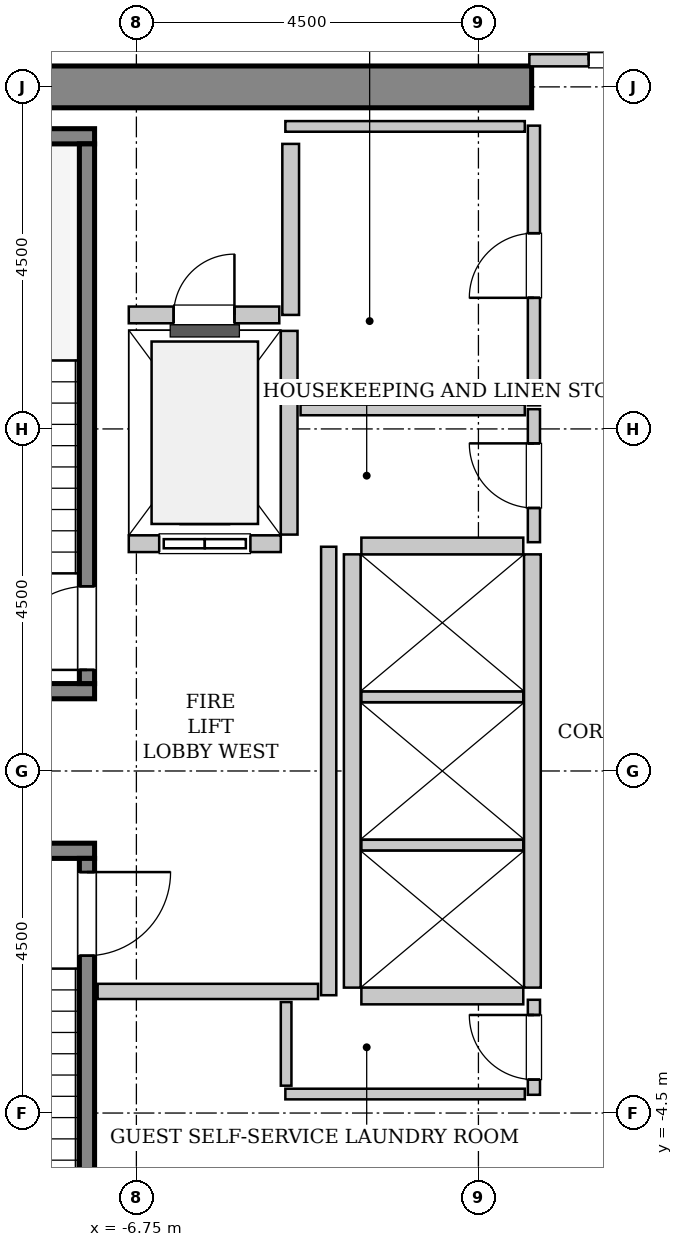
"""IFC4 building model, lengths in metres.
Left out: names, types, materials, properties, quantities, classifications, styles, units other than length and angle.
Written with IfcOpenShell. Run it as: python <this file> out.ifc"""

import sys

from ifc_helpers import new_model, si_unit, direction, frame, frame_2d, origin, place, context, subcontext, project, spatial, rectangle, extrude, source, transform, mapped, element, fill, save


model = new_model("IFC4")
c1 = context("Model", 3, precision=1e-05, world=origin(), true_north=direction((0.0, 1.0)))
c2 = subcontext(c1, "Body", "Model", "MODEL_VIEW")
j1 = project(units=[si_unit("LENGTHUNIT", "METRE"), si_unit("PLANEANGLEUNIT", "RADIAN")], contexts=[c1])
p1 = place(None, origin())
s1 = spatial("IfcSite", under=j1, at=p1, CompositionType="ELEMENT")
p2 = place(p1, origin())
s2 = spatial("IfcBuilding", under=s1, at=p2, CompositionType="ELEMENT")
p3 = place(p2, frame((0.0, 0.0, 167.8)))
s3 = spatial("IfcBuildingStorey", under=s2, at=p3, CompositionType="ELEMENT", Elevation=167.8)
m1 = source(origin(), c2, "Body", "SweptSolid", [
    extrude(rectangle(XDim=9.975, YDim=0.55, at=frame_2d((4.987, 0.0))), origin(), (0.0, 0.0, 1.0), 3.8),
])
p4 = place(p3, frame((-11.525, 9.0, 0.0), z_axis=(0.0, 0.0, 1.0), x_axis=(1.0, 0.0, 0.0)))
e1 = element("IfcWall", 1, at=p4, inside=s3, PredefinedType="SHEAR", context=c2, shape_type="MappedRepresentation", body=[
    mapped(m1, transform((0.0, 0.0, 0.0), x_axis=(1.0, 0.0, 0.0), y_axis=(0.0, 1.0, 0.0), z_axis=(0.0, 0.0, 1.0), scale=1.0)),
])
m2 = source(origin(), c2, "Body", "SweptSolid", [
    extrude(rectangle(XDim=3.4, YDim=0.2, at=frame_2d((1.7, 0.0))), origin(), (0.0, 0.0, 1.0), 3.8),
])
p5 = place(p3, frame((-7.3, 1.05, 0.0), z_axis=(0.0, 0.0, 1.0), x_axis=(-1.0, 0.0, 0.0)))
e2 = element("IfcWall", 2, at=p5, inside=s3, PredefinedType="SOLIDWALL", context=c2, shape_type="MappedRepresentation", body=[
    mapped(m2, transform((0.0, 0.0, 0.0), x_axis=(1.0, 0.0, 0.0), y_axis=(0.0, 1.0, 0.0), z_axis=(0.0, 0.0, 1.0), scale=1.0)),
])
m3 = source(origin(), c2, "Body", "SweptSolid", [
    extrude(rectangle(XDim=3.68, YDim=0.2, at=frame_2d((1.84, 0.0))), origin(), (0.0, 0.0, 1.0), 3.8),
])
p6 = place(p3, frame((-7.3, 8.35, 0.0), z_axis=(0.0, 0.0, 1.0), x_axis=(-1.0, 0.0, 0.0)))
e3 = element("IfcWall", 3, at=p6, inside=s3, PredefinedType="SOLIDWALL", context=c2, shape_type="MappedRepresentation", body=[
    mapped(m3, transform((0.0, 0.0, 0.0), x_axis=(1.0, 0.0, 0.0), y_axis=(0.0, 1.0, 0.0), z_axis=(0.0, 0.0, 1.0), scale=1.0)),
])
m4 = source(origin(), c2, "Body", "SweptSolid", [
    extrude(rectangle(XDim=7.1, YDim=0.2, at=frame_2d((3.55, 0.0))), origin(), (0.0, 0.0, 1.0), 3.8),
])
p7 = place(p3, frame((-7.4, 1.15, 0.0), z_axis=(0.0, 0.0, 1.0), x_axis=(0.0, 1.0, 0.0)))
e4 = element("IfcWall", 4, at=p7, inside=s3, PredefinedType="SOLIDWALL", context=c2, shape_type="MappedRepresentation", body=[
    mapped(m4, transform((0.0, 0.0, 0.0), x_axis=(1.0, 0.0, 0.0), y_axis=(0.0, 1.0, 0.0), z_axis=(0.0, 0.0, 1.0), scale=1.0)),
])
p8 = place(p7, frame((0.18, 0.0, 0.0)))
e5 = element("IfcOpeningElement", 5, at=p8, cuts=e4, PredefinedType="OPENING", context=c2, shape_type="SweptSolid", body=[
    extrude(rectangle(XDim=1.1, YDim=2.15, at=frame_2d((0.55, 1.075))), frame((0.0, 0.11, 0.0), z_axis=(0.0, -1.0, 0.0), x_axis=(1.0, 0.0, 0.0)), (0.0, 0.0, 1.0), 0.22),
])
p9 = place(p3, frame((-10.7, -1.05, 0.0), z_axis=(0.0, 0.0, 1.0), x_axis=(1.0, 0.0, 0.0)))
e6 = element("IfcWall", 6, at=p9, inside=s3, PredefinedType="SOLIDWALL", context=c2, shape_type="MappedRepresentation", body=[
    mapped(m2, transform((0.0, 0.0, 0.0), x_axis=(1.0, 0.0, 0.0), y_axis=(0.0, 1.0, 0.0), z_axis=(0.0, 0.0, 1.0), scale=1.0)),
])
p10 = place(p3, frame((-7.4, -1.15, 0.0), z_axis=(0.0, 0.0, 1.0), x_axis=(0.0, -1.0, 0.0)))
e7 = element("IfcWall", 7, at=p10, inside=s3, PredefinedType="SOLIDWALL", context=c2, shape_type="MappedRepresentation", body=[
    mapped(m4, transform((0.0, 0.0, 0.0), x_axis=(1.0, 0.0, 0.0), y_axis=(0.0, 1.0, 0.0), z_axis=(0.0, 0.0, 1.0), scale=1.0)),
])
p11 = place(p10, frame((0.18, 0.0, 0.0)))
e8 = element("IfcOpeningElement", 8, at=p11, cuts=e7, PredefinedType="OPENING", context=c2, shape_type="SweptSolid", body=[
    extrude(rectangle(XDim=1.1, YDim=2.15, at=frame_2d((0.55, 1.075))), frame((0.0, 0.11, 0.0), z_axis=(0.0, -1.0, 0.0), x_axis=(1.0, 0.0, 0.0)), (0.0, 0.0, 1.0), 0.22),
])
m5 = source(origin(), c2, "Body", "SweptSolid", [
    extrude(rectangle(XDim=2.0, YDim=0.22, at=frame_2d((1.0, 0.0))), origin(), (0.0, 0.0, 1.0), 3.535),
])
p12 = place(p3, frame((-6.85, 2.99, 0.0), z_axis=(0.0, 0.0, 1.0), x_axis=(1.0, 0.0, 0.0)))
e9 = element("IfcWall", 9, at=p12, inside=s3, PredefinedType="SOLIDWALL", context=c2, shape_type="MappedRepresentation", body=[
    mapped(m5, transform((0.0, 0.0, 0.0), x_axis=(1.0, 0.0, 0.0), y_axis=(0.0, 1.0, 0.0), z_axis=(0.0, 0.0, 1.0), scale=1.0)),
])
p13 = place(p12, frame((0.4, 0.0, 0.0)))
e10 = element("IfcOpeningElement", 10, at=p13, cuts=e9, PredefinedType="OPENING", context=c2, shape_type="SweptSolid", body=[
    extrude(rectangle(XDim=1.2, YDim=2.2, at=frame_2d((0.6, 1.1))), frame((0.0, 0.12, 0.0), z_axis=(0.0, -1.0, 0.0), x_axis=(1.0, 0.0, 0.0)), (0.0, 0.0, 1.0), 0.24),
])
m6 = source(origin(), c2, "Body", "SweptSolid", [
    extrude(rectangle(XDim=2.68, YDim=0.22, at=frame_2d((1.34, 0.0))), origin(), (0.0, 0.0, 1.0), 3.535),
])
p14 = place(p3, frame((-4.74, 3.11, 0.0), z_axis=(0.0, 0.0, 1.0), x_axis=(0.0, 1.0, 0.0)))
e11 = element("IfcWall", 11, at=p14, inside=s3, PredefinedType="SOLIDWALL", context=c2, shape_type="MappedRepresentation", body=[
    mapped(m6, transform((0.0, 0.0, 0.0), x_axis=(1.0, 0.0, 0.0), y_axis=(0.0, 1.0, 0.0), z_axis=(0.0, 0.0, 1.0), scale=1.0)),
])
m7 = source(origin(), c2, "Body", "SweptSolid", [
    extrude(rectangle(XDim=5.7, YDim=0.22, at=frame_2d((2.85, 0.0))), origin(), (0.0, 0.0, 1.0), 3.535),
])
for number, where, z_axis, x_axis in (
    (12, (-1.54, -2.85, 0.0), (0.0, 0.0, 1.0), (0.0, 1.0, 0.0)),
    (13, (-3.91, 2.85, 0.0), (0.0, 0.0, 1.0), (0.0, -1.0, 0.0)),
):
    element("IfcWall", number, at=place(p3, frame(where, z_axis=z_axis, x_axis=x_axis)), inside=s3, PredefinedType="SOLIDWALL", context=c2, shape_type="MappedRepresentation", body=[
        mapped(m7, transform((0.0, 0.0, 0.0), x_axis=(1.0, 0.0, 0.0), y_axis=(0.0, 1.0, 0.0), z_axis=(0.0, 0.0, 1.0), scale=1.0)),
    ])
m8 = source(origin(), c2, "Body", "SweptSolid", [
    extrude(rectangle(XDim=2.13, YDim=0.22, at=frame_2d((1.065, 0.0))), origin(), (0.0, 0.0, 1.0), 3.535),
])
p15 = place(p3, frame((-3.79, -2.96, 0.0), z_axis=(0.0, 0.0, 1.0), x_axis=(1.0, 0.0, 0.0)))
e14 = element("IfcWall", 14, at=p15, inside=s3, PredefinedType="SOLIDWALL", context=c2, shape_type="MappedRepresentation", body=[
    mapped(m8, transform((0.0, 0.0, 0.0), x_axis=(1.0, 0.0, 0.0), y_axis=(0.0, 1.0, 0.0), z_axis=(0.0, 0.0, 1.0), scale=1.0)),
])
m9 = source(origin(), c2, "Body", "SweptSolid", [
    extrude(rectangle(XDim=2.13, YDim=0.14, at=frame_2d((1.065, 0.0))), origin(), (0.0, 0.0, 1.0), 3.535),
])
for number, where, z_axis, x_axis in (
    (15, (-3.79, -0.975, 0.0), (0.0, 0.0, 1.0), (1.0, 0.0, 0.0)),
    (16, (-3.79, 0.975, 0.0), (0.0, 0.0, 1.0), (1.0, 0.0, 0.0)),
):
    element("IfcWall", number, at=place(p3, frame(where, z_axis=z_axis, x_axis=x_axis)), inside=s3, PredefinedType="PARTITIONING", context=c2, shape_type="MappedRepresentation", body=[
        mapped(m9, transform((0.0, 0.0, 0.0), x_axis=(1.0, 0.0, 0.0), y_axis=(0.0, 1.0, 0.0), z_axis=(0.0, 0.0, 1.0), scale=1.0)),
    ])
p16 = place(p3, frame((-1.66, 2.96, 0.0), z_axis=(0.0, 0.0, 1.0), x_axis=(-1.0, 0.0, 0.0)))
e17 = element("IfcWall", 17, at=p16, inside=s3, PredefinedType="SOLIDWALL", context=c2, shape_type="MappedRepresentation", body=[
    mapped(m8, transform((0.0, 0.0, 0.0), x_axis=(1.0, 0.0, 0.0), y_axis=(0.0, 1.0, 0.0), z_axis=(0.0, 0.0, 1.0), scale=1.0)),
])
m10 = source(origin(), c2, "Body", "SweptSolid", [
    extrude(rectangle(XDim=2.25, YDim=0.22, at=frame_2d((1.125, 0.0))), origin(), (0.0, 0.0, 1.0), 3.535),
])
p17 = place(p3, frame((-4.72, 6.0, 0.0), z_axis=(0.0, 0.0, 1.0), x_axis=(0.0, 1.0, 0.0)))
e18 = element("IfcWall", 18, at=p17, inside=s3, PredefinedType="SOLIDWALL", context=c2, shape_type="MappedRepresentation", body=[
    mapped(m10, transform((0.0, 0.0, 0.0), x_axis=(1.0, 0.0, 0.0), y_axis=(0.0, 1.0, 0.0), z_axis=(0.0, 0.0, 1.0), scale=1.0)),
])
m11 = source(origin(), c2, "Body", "SweptSolid", [
    extrude(rectangle(XDim=1.98, YDim=0.22, at=frame_2d((0.99, 0.0))), origin(), (0.0, 0.0, 1.0), 3.535),
])
p18 = place(p3, frame((-6.85, 6.0, 0.0), z_axis=(0.0, 0.0, 1.0), x_axis=(1.0, 0.0, 0.0)))
e19 = element("IfcWall", 19, at=p18, inside=s3, PredefinedType="SOLIDWALL", context=c2, shape_type="MappedRepresentation", body=[
    mapped(m11, transform((0.0, 0.0, 0.0), x_axis=(1.0, 0.0, 0.0), y_axis=(0.0, 1.0, 0.0), z_axis=(0.0, 0.0, 1.0), scale=1.0)),
])
p19 = place(p18, frame((0.59, 0.0, 0.0)))
e20 = element("IfcOpeningElement", 20, at=p19, cuts=e19, PredefinedType="OPENING", context=c2, shape_type="SweptSolid", body=[
    extrude(rectangle(XDim=0.8, YDim=2.0, at=frame_2d((0.4, 1.0))), frame((0.0, 0.12, 0.0), z_axis=(0.0, -1.0, 0.0), x_axis=(1.0, 0.0, 0.0)), (0.0, 0.0, 1.0), 0.24),
])
m12 = source(origin(), c2, "Body", "SweptSolid", [
    extrude(rectangle(XDim=5.9, YDim=0.2, at=frame_2d((2.95, 0.0))), origin(), (0.0, 0.0, 1.0), 3.535),
])
p20 = place(p3, frame((-4.22, -2.95, 0.0), z_axis=(0.0, 0.0, 1.0), x_axis=(0.0, 1.0, 0.0)))
e21 = element("IfcWall", 21, at=p20, inside=s3, PredefinedType="PARTITIONING", context=c2, shape_type="MappedRepresentation", body=[
    mapped(m12, transform((0.0, 0.0, 0.0), x_axis=(1.0, 0.0, 0.0), y_axis=(0.0, 1.0, 0.0), z_axis=(0.0, 0.0, 1.0), scale=1.0)),
])
m13 = source(origin(), c2, "Body", "SweptSolid", [
    extrude(rectangle(XDim=2.9, YDim=0.2, at=frame_2d((1.45, 0.0))), origin(), (0.0, 0.0, 1.0), 3.535),
])
p21 = place(p3, frame((-7.26, -2.9, 0.0), z_axis=(0.0, 0.0, 1.0), x_axis=(1.0, 0.0, 0.0)))
e22 = element("IfcWall", 22, at=p21, inside=s3, PredefinedType="PARTITIONING", context=c2, shape_type="MappedRepresentation", body=[
    mapped(m13, transform((0.0, 0.0, 0.0), x_axis=(1.0, 0.0, 0.0), y_axis=(0.0, 1.0, 0.0), z_axis=(0.0, 0.0, 1.0), scale=1.0)),
])
m14 = source(origin(), c2, "Body", "SweptSolid", [
    extrude(rectangle(XDim=3.16, YDim=0.16, at=frame_2d((1.58, 0.0))), origin(), (0.0, 0.0, 1.0), 2.425),
])
p22 = place(p3, frame((-1.58, 9.35, 0.0), z_axis=(0.0, 0.0, 1.0), x_axis=(1.0, 0.0, 0.0)))
e23 = element("IfcWall", 23, at=p22, inside=s3, PredefinedType="PARTITIONING", context=c2, shape_type="MappedRepresentation", body=[
    mapped(m14, transform((0.0, 0.0, 0.0), x_axis=(1.0, 0.0, 0.0), y_axis=(0.0, 1.0, 0.0), z_axis=(0.0, 0.0, 1.0), scale=1.0)),
])
p23 = place(p22, frame((0.78, 0.0, 0.0)))
e24 = element("IfcOpeningElement", 24, at=p23, cuts=e23, PredefinedType="OPENING", context=c2, shape_type="SweptSolid", body=[
    extrude(rectangle(XDim=1.6, YDim=2.3, at=frame_2d((0.8, 1.15))), frame((0.0, 0.09, 0.0), z_axis=(0.0, -1.0, 0.0), x_axis=(1.0, 0.0, 0.0)), (0.0, 0.0, 1.0), 0.18),
])
m15 = source(origin(), c2, "Body", "SweptSolid", [
    extrude(rectangle(XDim=1.75, YDim=0.16, at=frame_2d((0.875, 0.0))), origin(), (0.0, 0.0, 1.0), 3.535),
])
p24 = place(p3, frame((-1.52, 3.01, 0.0), z_axis=(0.0, 0.0, 1.0), x_axis=(0.0, 1.0, 0.0)))
e25 = element("IfcWall", 25, at=p24, inside=s3, PredefinedType="PARTITIONING", context=c2, shape_type="MappedRepresentation", body=[
    mapped(m15, transform((0.0, 0.0, 0.0), x_axis=(1.0, 0.0, 0.0), y_axis=(0.0, 1.0, 0.0), z_axis=(0.0, 0.0, 1.0), scale=1.0)),
])
p25 = place(p24, frame((0.45, 0.0, 0.0)))
e26 = element("IfcOpeningElement", 26, at=p25, cuts=e25, PredefinedType="OPENING", context=c2, shape_type="SweptSolid", body=[
    extrude(rectangle(XDim=0.85, YDim=2.1, at=frame_2d((0.425, 1.05))), frame((0.0, 0.09, 0.0), z_axis=(0.0, -1.0, 0.0), x_axis=(1.0, 0.0, 0.0)), (0.0, 0.0, 1.0), 0.18),
])
m16 = source(origin(), c2, "Body", "SweptSolid", [
    extrude(rectangle(XDim=2.95, YDim=0.14, at=frame_2d((1.475, 0.0))), origin(), (0.0, 0.0, 1.0), 3.535),
])
p26 = place(p3, frame((-4.59, 4.75, 0.0), z_axis=(0.0, 0.0, 1.0), x_axis=(1.0, 0.0, 0.0)))
e27 = element("IfcWall", 27, at=p26, inside=s3, PredefinedType="PARTITIONING", context=c2, shape_type="MappedRepresentation", body=[
    mapped(m16, transform((0.0, 0.0, 0.0), x_axis=(1.0, 0.0, 0.0), y_axis=(0.0, 1.0, 0.0), z_axis=(0.0, 0.0, 1.0), scale=1.0)),
])
m17 = source(origin(), c2, "Body", "SweptSolid", [
    extrude(rectangle(XDim=3.68, YDim=0.16, at=frame_2d((1.84, 0.0))), origin(), (0.0, 0.0, 1.0), 3.535),
])
p27 = place(p3, frame((-1.52, 4.81, 0.0), z_axis=(0.0, 0.0, 1.0), x_axis=(0.0, 1.0, 0.0)))
e28 = element("IfcWall", 28, at=p27, inside=s3, PredefinedType="PARTITIONING", context=c2, shape_type="MappedRepresentation", body=[
    mapped(m17, transform((0.0, 0.0, 0.0), x_axis=(1.0, 0.0, 0.0), y_axis=(0.0, 1.0, 0.0), z_axis=(0.0, 0.0, 1.0), scale=1.0)),
])
p28 = place(p27, frame((1.415, 0.0, 0.0)))
e29 = element("IfcOpeningElement", 29, at=p28, cuts=e28, PredefinedType="OPENING", context=c2, shape_type="SweptSolid", body=[
    extrude(rectangle(XDim=0.85, YDim=2.1, at=frame_2d((0.425, 1.05))), frame((0.0, 0.09, 0.0), z_axis=(0.0, -1.0, 0.0), x_axis=(1.0, 0.0, 0.0)), (0.0, 0.0, 1.0), 0.18),
])
m18 = source(origin(), c2, "Body", "SweptSolid", [
    extrude(rectangle(XDim=3.15, YDim=0.14, at=frame_2d((1.575, 0.0))), origin(), (0.0, 0.0, 1.0), 3.535),
])
p29 = place(p3, frame((-4.79, 8.48, 0.0), z_axis=(0.0, 0.0, 1.0), x_axis=(1.0, 0.0, 0.0)))
e30 = element("IfcWall", 30, at=p29, inside=s3, PredefinedType="PARTITIONING", context=c2, shape_type="MappedRepresentation", body=[
    mapped(m18, transform((0.0, 0.0, 0.0), x_axis=(1.0, 0.0, 0.0), y_axis=(0.0, 1.0, 0.0), z_axis=(0.0, 0.0, 1.0), scale=1.0)),
])
m19 = source(origin(), c2, "Body", "SweptSolid", [
    extrude(rectangle(XDim=1.25, YDim=0.16, at=frame_2d((0.625, 0.0))), origin(), (0.0, 0.0, 1.0), 3.535),
])
p30 = place(p3, frame((-1.52, -4.26, 0.0), z_axis=(0.0, 0.0, 1.0), x_axis=(0.0, 1.0, 0.0)))
e31 = element("IfcWall", 31, at=p30, inside=s3, PredefinedType="PARTITIONING", context=c2, shape_type="MappedRepresentation", body=[
    mapped(m19, transform((0.0, 0.0, 0.0), x_axis=(1.0, 0.0, 0.0), y_axis=(0.0, 1.0, 0.0), z_axis=(0.0, 0.0, 1.0), scale=1.0)),
])
p31 = place(p30, frame((0.2, 0.0, 0.0)))
e32 = element("IfcOpeningElement", 32, at=p31, cuts=e31, PredefinedType="OPENING", context=c2, shape_type="SweptSolid", body=[
    extrude(rectangle(XDim=0.85, YDim=2.1, at=frame_2d((0.425, 1.05))), frame((0.0, 0.09, 0.0), z_axis=(0.0, -1.0, 0.0), x_axis=(1.0, 0.0, 0.0)), (0.0, 0.0, 1.0), 0.18),
])
p32 = place(p3, frame((-4.79, -4.25, 0.0), z_axis=(0.0, 0.0, 1.0), x_axis=(1.0, 0.0, 0.0)))
e33 = element("IfcWall", 33, at=p32, inside=s3, PredefinedType="PARTITIONING", context=c2, shape_type="MappedRepresentation", body=[
    mapped(m18, transform((0.0, 0.0, 0.0), x_axis=(1.0, 0.0, 0.0), y_axis=(0.0, 1.0, 0.0), z_axis=(0.0, 0.0, 1.0), scale=1.0)),
])
m20 = source(origin(), c2, "Body", "SweptSolid", [
    extrude(rectangle(XDim=1.1, YDim=0.14, at=frame_2d((0.55, 0.0))), origin(), (0.0, 0.0, 1.0), 3.535),
])
p33 = place(p3, frame((-4.78, -4.14, 0.0), z_axis=(0.0, 0.0, 1.0), x_axis=(0.0, 1.0, 0.0)))
e34 = element("IfcWall", 34, at=p33, inside=s3, PredefinedType="PARTITIONING", context=c2, shape_type="MappedRepresentation", body=[
    mapped(m20, transform((0.0, 0.0, 0.0), x_axis=(1.0, 0.0, 0.0), y_axis=(0.0, 1.0, 0.0), z_axis=(0.0, 0.0, 1.0), scale=1.0)),
])
m21 = source(origin(), c2, "Body", "SweptSolid", [
    extrude(rectangle(XDim=1.1, YDim=2.15, at=frame_2d((0.55, 1.075))), frame((0.0, 0.025, 0.0), z_axis=(0.0, -1.0, 0.0), x_axis=(1.0, 0.0, 0.0)), (0.0, 0.0, 1.0), 0.05),
])
p34 = place(p8, origin())
e35 = element("IfcDoor", 35, at=p34, inside=s3, OperationType="SINGLE_SWING_LEFT", PredefinedType="DOOR", context=c2, shape_type="MappedRepresentation", body=[
    mapped(m21, transform((0.0, 0.0, 0.0), x_axis=(1.0, 0.0, 0.0), y_axis=(0.0, 1.0, 0.0), z_axis=(0.0, 0.0, 1.0), scale=1.0)),
])
fill(e5, e35)
p35 = place(p11, origin())
e36 = element("IfcDoor", 36, at=p35, inside=s3, OperationType="SINGLE_SWING_LEFT", PredefinedType="DOOR", context=c2, shape_type="MappedRepresentation", body=[
    mapped(m21, transform((0.0, 0.0, 0.0), x_axis=(1.0, 0.0, 0.0), y_axis=(0.0, 1.0, 0.0), z_axis=(0.0, 0.0, 1.0), scale=1.0)),
])
fill(e8, e36)
m22 = source(origin(), c2, "Body", "SweptSolid", [
    extrude(rectangle(XDim=1.2, YDim=2.2, at=frame_2d((0.6, 1.1))), frame((0.0, 0.025, 0.0), z_axis=(0.0, -1.0, 0.0), x_axis=(1.0, 0.0, 0.0)), (0.0, 0.0, 1.0), 0.05),
])
p36 = place(p13, origin())
e37 = element("IfcDoor", 37, at=p36, inside=s3, OperationType="SLIDING_TO_LEFT", PredefinedType="DOOR", context=c2, shape_type="MappedRepresentation", body=[
    mapped(m22, transform((0.0, 0.0, 0.0), x_axis=(1.0, 0.0, 0.0), y_axis=(0.0, 1.0, 0.0), z_axis=(0.0, 0.0, 1.0), scale=1.0)),
])
fill(e10, e37)
m23 = source(origin(), c2, "Body", "SweptSolid", [
    extrude(rectangle(XDim=0.8, YDim=2.0, at=frame_2d((0.4, 1.0))), frame((0.0, 0.025, 0.0), z_axis=(0.0, -1.0, 0.0), x_axis=(1.0, 0.0, 0.0)), (0.0, 0.0, 1.0), 0.05),
])
p37 = place(p19, origin())
e38 = element("IfcDoor", 38, at=p37, inside=s3, OperationType="SINGLE_SWING_RIGHT", PredefinedType="TRAPDOOR", context=c2, shape_type="MappedRepresentation", body=[
    mapped(m23, transform((0.0, 0.0, 0.0), x_axis=(1.0, 0.0, 0.0), y_axis=(0.0, 1.0, 0.0), z_axis=(0.0, 0.0, 1.0), scale=1.0)),
])
fill(e20, e38)
m24 = source(origin(), c2, "Body", "SweptSolid", [
    extrude(rectangle(XDim=1.6, YDim=2.3, at=frame_2d((0.8, 1.15))), frame((0.0, 0.025, 0.0), z_axis=(0.0, -1.0, 0.0), x_axis=(1.0, 0.0, 0.0)), (0.0, 0.0, 1.0), 0.05),
])
p38 = place(p23, origin())
e39 = element("IfcDoor", 39, at=p38, inside=s3, OperationType="DOUBLE_DOOR_SINGLE_SWING", PredefinedType="DOOR", context=c2, shape_type="MappedRepresentation", body=[
    mapped(m24, transform((0.0, 0.0, 0.0), x_axis=(1.0, 0.0, 0.0), y_axis=(0.0, 1.0, 0.0), z_axis=(0.0, 0.0, 1.0), scale=1.0)),
])
fill(e24, e39)
m25 = source(origin(), c2, "Body", "SweptSolid", [
    extrude(rectangle(XDim=0.85, YDim=2.1, at=frame_2d((0.425, 1.05))), frame((0.0, 0.025, 0.0), z_axis=(0.0, -1.0, 0.0), x_axis=(1.0, 0.0, 0.0)), (0.0, 0.0, 1.0), 0.05),
])
p39 = place(p25, origin())
e40 = element("IfcDoor", 40, at=p39, inside=s3, OperationType="SINGLE_SWING_RIGHT", PredefinedType="DOOR", context=c2, shape_type="MappedRepresentation", body=[
    mapped(m25, transform((0.0, 0.0, 0.0), x_axis=(1.0, 0.0, 0.0), y_axis=(0.0, 1.0, 0.0), z_axis=(0.0, 0.0, 1.0), scale=1.0)),
])
fill(e26, e40)
p40 = place(p28, origin())
e41 = element("IfcDoor", 41, at=p40, inside=s3, OperationType="SINGLE_SWING_LEFT", PredefinedType="DOOR", context=c2, shape_type="MappedRepresentation", body=[
    mapped(m25, transform((0.0, 0.0, 0.0), x_axis=(1.0, 0.0, 0.0), y_axis=(0.0, 1.0, 0.0), z_axis=(0.0, 0.0, 1.0), scale=1.0)),
])
fill(e29, e41)
p41 = place(p31, origin())
e42 = element("IfcDoor", 42, at=p41, inside=s3, OperationType="SINGLE_SWING_RIGHT", PredefinedType="DOOR", context=c2, shape_type="MappedRepresentation", body=[
    mapped(m25, transform((0.0, 0.0, 0.0), x_axis=(1.0, 0.0, 0.0), y_axis=(0.0, 1.0, 0.0), z_axis=(0.0, 0.0, 1.0), scale=1.0)),
])
fill(e32, e42)
save(model, sys.argv[1])
